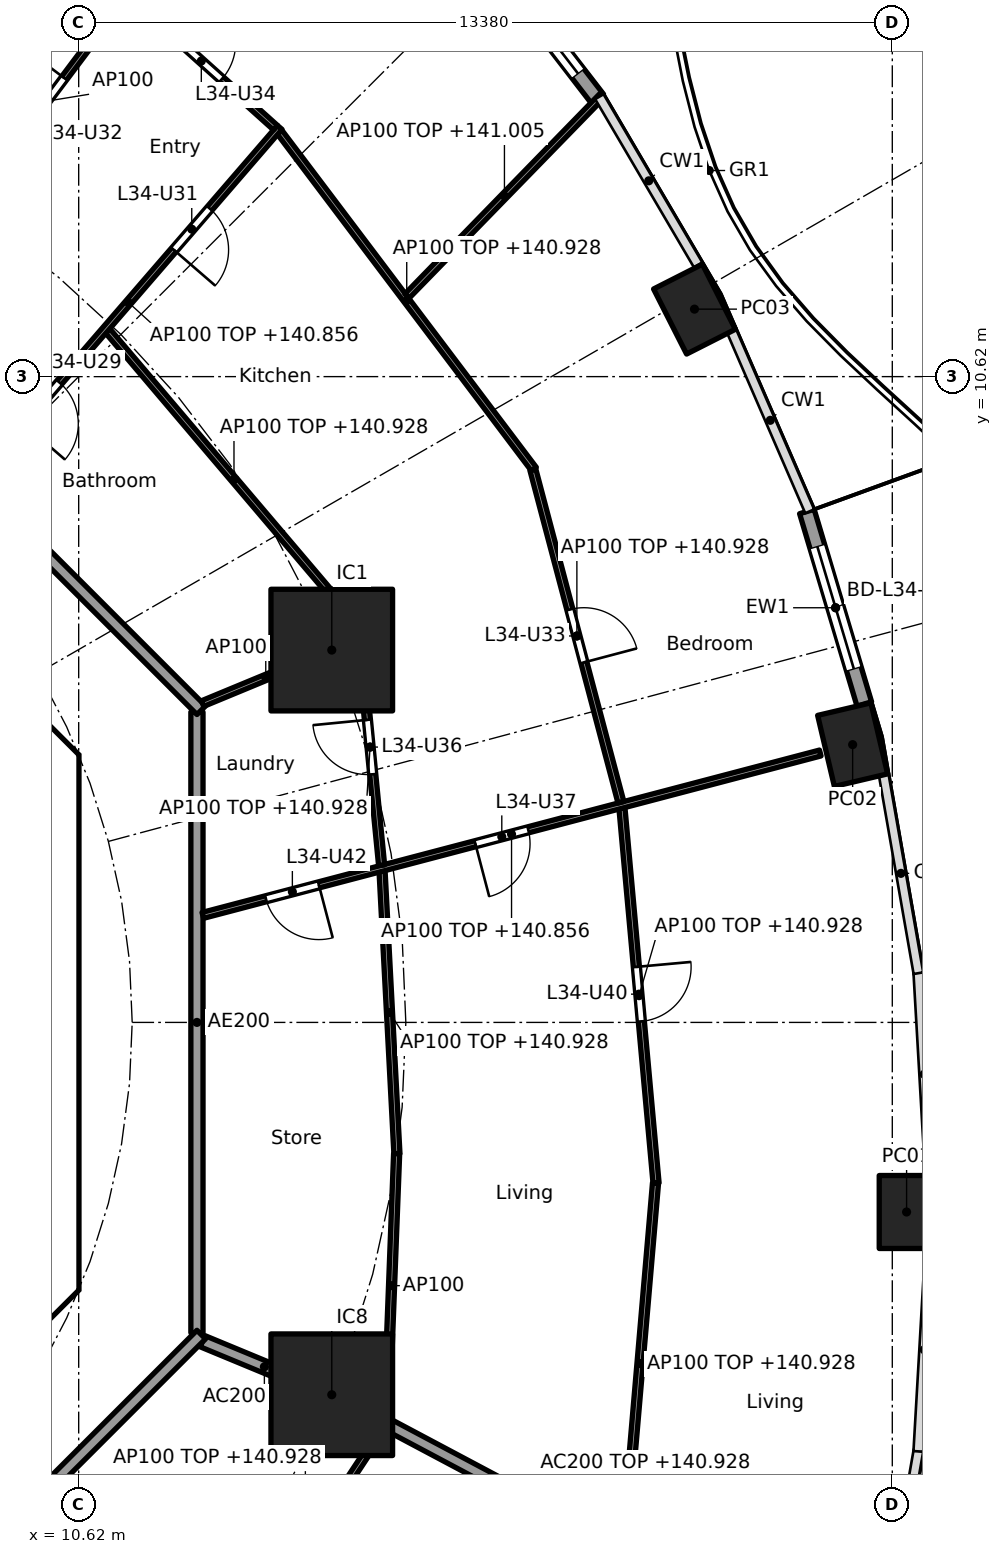
"""IFC4 building model, lengths in metres.
Left out: names, types, materials, properties, quantities, classifications, styles, units other than length and angle.
Written with IfcOpenShell. Run it as: python <this file> out.ifc"""

import sys

from ifc_helpers import new_model, si_unit, direction, frame, frame_2d, origin, origin_2d, place, context, subcontext, project, spatial, polyline, rectangle, hollow_rectangle, outline, extrude, element, fill, save


model = new_model("IFC4")
c1 = context("Model", 3, precision=1e-05, world=origin(), true_north=direction((0.0, 1.0)))
c2 = subcontext(c1, "Body", "Model", "MODEL_VIEW")
j1 = project(units=[si_unit("LENGTHUNIT", "METRE"), si_unit("PLANEANGLEUNIT", "RADIAN")], contexts=[c1])
p1 = place(None, origin())
s1 = spatial("IfcSite", under=j1, at=p1, CompositionType="ELEMENT")
p2 = place(p1, origin())
s2 = spatial("IfcBuilding", under=s1, at=p2, CompositionType="ELEMENT")
p3 = place(p2, frame((0.0, 0.0, 138.1)))
s3 = spatial("IfcBuildingStorey", under=s2, at=p3, CompositionType="ELEMENT", Elevation=138.1)
for number, where, z_axis, x_axis in (
    (1, (24.235, -3.118, 0.0), (0.0, 0.0, 1.0), (0.0, 1.0, 0.0)),
    (2, (23.348, 4.568, 0.0), (0.0, 0.0, 1.0), (-0.229, 0.973, 0.0)),
    (3, (20.747, 11.73, 0.0), (0.0, 0.0, 1.0), (-0.452, 0.892, 0.0)),
):
    element("IfcColumn", number, at=place(p3, frame(where, z_axis=z_axis, x_axis=x_axis)), inside=s3, PredefinedType="COLUMN", context=c2, shape_type="SweptSolid", body=[
        extrude(hollow_rectangle(XDim=1.2, YDim=0.9, WallThickness=0.04, at=origin_2d()), origin(), (0.0, 0.0, 1.0), 3.7),
    ])
for number, where, z_axis, x_axis in (
    (4, (14.782, 6.123, 0.0), (0.0, 0.0, 1.0), (1.0, 0.0, 0.0)),
    (5, (14.782, -6.123, 0.0), (0.0, 0.0, 1.0), (1.0, 0.0, 0.0)),
):
    element("IfcColumn", number, at=place(p3, frame(where, z_axis=z_axis, x_axis=x_axis)), inside=s3, PredefinedType="COLUMN", context=c2, shape_type="SweptSolid", body=[
        extrude(rectangle(XDim=2.0, YDim=2.0, at=origin_2d()), origin(), (0.0, 0.0, 1.0), 3.7),
    ])
p4 = place(p3, frame((22.595, 8.402, 0.0), z_axis=(0.0, 0.0, 1.0), x_axis=(0.285842038783, -0.958276749621, 0.0)))
e6 = element("IfcWall", 6, at=p4, inside=s3, PredefinedType="SOLIDWALL", context=c2, shape_type="SweptSolid", body=[
    extrude(rectangle(XDim=3.303, YDim=0.25, at=frame_2d((1.651, 0.0))), origin(), (0.0, 0.0, 1.0), 3.44),
])
p5 = place(p4, frame((0.602, 0.0, 0.0)))
e7 = element("IfcOpeningElement", 7, at=p5, cuts=e6, PredefinedType="OPENING", context=c2, shape_type="SweptSolid", body=[
    extrude(rectangle(XDim=2.1, YDim=2.4, at=frame_2d((1.05, 1.2))), frame((0.0, 0.135, 0.0), z_axis=(0.0, -1.0, 0.0), x_axis=(1.0, 0.0, 0.0)), (0.0, 0.0, 1.0), 0.27),
])
p6 = place(p3, frame((17.23, 17.682, 0.0), z_axis=(0.0, 0.0, 1.0), x_axis=(0.610429847179, -0.792070326217, 0.0)))
e8 = element("IfcWall", 8, at=p6, inside=s3, PredefinedType="SOLIDWALL", context=c2, shape_type="SweptSolid", body=[
    extrude(rectangle(XDim=3.149, YDim=0.25, at=frame_2d((1.575, 0.0))), origin(), (0.0, 0.0, 1.0), 3.44),
])
p7 = place(p6, frame((0.525, 0.0, 0.0)))
e9 = element("IfcOpeningElement", 9, at=p7, cuts=e8, PredefinedType="OPENING", context=c2, shape_type="SweptSolid", body=[
    extrude(rectangle(XDim=2.1, YDim=2.4, at=frame_2d((1.05, 1.2))), frame((0.0, 0.135, 0.0), z_axis=(0.0, -1.0, 0.0), x_axis=(1.0, 0.0, 0.0)), (0.0, 0.0, 1.0), 0.27),
])
p8 = place(p3, frame((9.988, 4.613, 0.0), z_axis=(0.0, 0.0, 1.0), x_axis=(-0.707106781187, 0.707106781187, 0.0)))
e10 = element("IfcWall", 10, at=p8, inside=s3, PredefinedType="SHEAR", context=c2, shape_type="SweptSolid", body=[
    extrude(rectangle(XDim=7.602, YDim=0.6, at=frame_2d((3.801, 0.0))), origin(), (0.0, 0.0, 1.0), 3.44),
])
p9 = place(p8, frame((3.201, 0.0, 0.0)))
e11 = element("IfcOpeningElement", 11, at=p9, cuts=e10, PredefinedType="OPENING", context=c2, shape_type="SweptSolid", body=[
    extrude(rectangle(XDim=1.2, YDim=2.1, at=frame_2d((0.6, 1.05))), frame((0.0, 0.31, 0.0), z_axis=(0.0, -1.0, 0.0), x_axis=(1.0, 0.0, 0.0)), (0.0, 0.0, 1.0), 0.62),
])
p10 = place(p3, frame((4.613, -9.988, 0.0), z_axis=(0.0, 0.0, 1.0), x_axis=(0.707106781187, 0.707106781187, 0.0)))
e12 = element("IfcWall", 12, at=p10, inside=s3, PredefinedType="SHEAR", context=c2, shape_type="SweptSolid", body=[
    extrude(rectangle(XDim=7.602, YDim=0.6, at=frame_2d((3.801, 0.0))), origin(), (0.0, 0.0, 1.0), 3.44),
])
p11 = place(p10, frame((3.201, 0.0, 0.0)))
e13 = element("IfcOpeningElement", 13, at=p11, cuts=e12, PredefinedType="OPENING", context=c2, shape_type="SweptSolid", body=[
    extrude(rectangle(XDim=1.2, YDim=2.1, at=frame_2d((0.6, 1.05))), frame((0.0, 0.31, 0.0), z_axis=(0.0, -1.0, 0.0), x_axis=(1.0, 0.0, 0.0)), (0.0, 0.0, 1.0), 0.62),
])
p12 = place(p3, origin())
e14 = element("IfcWall", 14, at=p12, inside=s3, PredefinedType="SHEAR", context=c2, shape_type="SweptSolid", body=[
    extrude(outline(polyline([(9.776, -4.401), (10.025, -4.152), (10.025, -3.801), (10.025, 4.152), (9.776, 4.401), (10.2, 4.825), (10.625, 4.401), (10.625, -4.401), (10.2, -4.825), (9.776, -4.401)])), origin(), (0.0, 0.0, 1.0), 3.44),
])
p13 = place(p3, frame((12.657, -5.243, 0.0), z_axis=(0.0, 0.0, 1.0), x_axis=(0.923846436004, -0.382763324632, 0.0)))
e15 = element("IfcWall", 15, at=p13, inside=s3, PredefinedType="PARTITIONING", context=c2, shape_type="SweptSolid", body=[
    extrude(rectangle(XDim=2.2, YDim=0.2, at=frame_2d((1.1, 0.0))), origin(), (0.0, 0.0, 1.0), 3.44),
])
p14 = place(p3, frame((14.826, -6.146, 0.0), z_axis=(0.0, 0.0, 1.0), x_axis=(0.883012998471, -0.469348532044, 0.0)))
e16 = element("IfcWall", 16, at=p14, inside=s3, PredefinedType="PARTITIONING", context=c2, shape_type="SweptSolid", body=[
    extrude(rectangle(XDim=9.172, YDim=0.2, at=frame_2d((4.586, 0.0))), origin(), (0.0, 0.0, 1.0), 2.828),
])
p15 = place(p3, frame((12.565, -5.104, 0.0), z_axis=(0.0, 0.0, 1.0), x_axis=(0.0, 1.0, 0.0)))
e17 = element("IfcWall", 17, at=p15, inside=s3, PredefinedType="PARTITIONING", context=c2, shape_type="SweptSolid", body=[
    extrude(rectangle(XDim=10.209, YDim=0.2, at=frame_2d((5.104, 0.0))), origin(), (0.0, 0.0, 1.0), 3.44),
])
p16 = place(p3, frame((12.635, 5.134, 0.0), z_axis=(0.0, 0.0, 1.0), x_axis=(-0.707106781187, 0.707106781187, 0.0)))
e18 = element("IfcWall", 18, at=p16, inside=s3, PredefinedType="PARTITIONING", context=c2, shape_type="SweptSolid", body=[
    extrude(rectangle(XDim=10.609, YDim=0.2, at=frame_2d((5.305, 0.0))), origin(), (0.0, 0.0, 1.0), 3.44),
])
p17 = place(p16, frame((6.106, 0.0, 0.0)))
e19 = element("IfcOpeningElement", 19, at=p17, cuts=e18, PredefinedType="OPENING", context=c2, shape_type="SweptSolid", body=[
    extrude(rectangle(XDim=1.0, YDim=2.1, at=frame_2d((0.5, 1.05))), frame((0.0, 0.11, 0.0), z_axis=(0.0, -1.0, 0.0), x_axis=(1.0, 0.0, 0.0)), (0.0, 0.0, 1.0), 0.22),
])
p18 = place(p3, frame((5.275, -12.494, 0.0), z_axis=(0.0, 0.0, 1.0), x_axis=(0.707106781187, 0.707106781187, 0.0)))
e20 = element("IfcWall", 20, at=p18, inside=s3, PredefinedType="PARTITIONING", context=c2, shape_type="SweptSolid", body=[
    extrude(rectangle(XDim=10.409, YDim=0.2, at=frame_2d((5.205, 0.0))), origin(), (0.0, 0.0, 1.0), 3.44),
])
p19 = place(p3, frame((15.853, -2.158, 0.0), z_axis=(0.0, 0.0, 1.0), x_axis=(-0.052509224895, 0.998620439056, 0.0)))
e21 = element("IfcWall", 21, at=p19, inside=s3, PredefinedType="PARTITIONING", context=c2, shape_type="SweptSolid", body=[
    extrude(rectangle(XDim=4.649, YDim=0.1, at=frame_2d((2.325, 0.0))), origin(), (0.0, 0.0, 1.0), 2.828),
])
p20 = place(p3, frame((15.849, -2.158, 0.0), z_axis=(0.0, 0.0, 1.0), x_axis=(-0.03838348155, -0.999263082648, 0.0)))
e22 = element("IfcWall", 22, at=p20, inside=s3, PredefinedType="PARTITIONING", context=c2, shape_type="SweptSolid", body=[
    extrude(rectangle(XDim=4.344, YDim=0.1, at=frame_2d((2.172, 0.0))), origin(), (0.0, 0.0, 1.0), 3.44),
])
p21 = place(p3, frame((20.115, -2.642, 0.0), z_axis=(0.0, 0.0, 1.0), x_axis=(-0.090567755363, 0.995890296011, 0.0)))
e23 = element("IfcWall", 23, at=p21, inside=s3, PredefinedType="PARTITIONING", context=c2, shape_type="SweptSolid", body=[
    extrude(rectangle(XDim=6.189, YDim=0.1, at=frame_2d((3.095, 0.0))), origin(), (0.0, 0.0, 1.0), 2.828),
])
p22 = place(p21, frame((2.67, 0.0, 0.0)))
e24 = element("IfcOpeningElement", 24, at=p22, cuts=e23, PredefinedType="OPENING", context=c2, shape_type="SweptSolid", body=[
    extrude(rectangle(XDim=0.9, YDim=2.1, at=frame_2d((0.45, 1.05))), frame((0.0, 0.06, 0.0), z_axis=(0.0, -1.0, 0.0), x_axis=(1.0, 0.0, 0.0)), (0.0, 0.0, 1.0), 0.12),
])
p23 = place(p3, frame((20.106, -2.642, 0.0), z_axis=(0.0, 0.0, 1.0), x_axis=(-0.085694058383, -0.996321498492, 0.0)))
e25 = element("IfcWall", 25, at=p23, inside=s3, PredefinedType="PARTITIONING", context=c2, shape_type="SweptSolid", body=[
    extrude(rectangle(XDim=5.957, YDim=0.1, at=frame_2d((2.979, 0.0))), origin(), (0.0, 0.0, 1.0), 2.828),
])
p24 = place(p3, frame((12.661, 1.76, 0.0), z_axis=(0.0, 0.0, 1.0), x_axis=(0.967120304949, 0.254319318488, 0.0)))
e26 = element("IfcWall", 26, at=p24, inside=s3, PredefinedType="PARTITIONING", context=c2, shape_type="SweptSolid", body=[
    extrude(rectangle(XDim=10.499, YDim=0.1, at=frame_2d((5.25, 0.0))), origin(), (0.0, 0.0, 1.0), 2.756),
])
p25 = place(p24, frame((4.634, 0.0, 0.0)))
e27 = element("IfcOpeningElement", 27, at=p25, cuts=e26, PredefinedType="OPENING", context=c2, shape_type="SweptSolid", body=[
    extrude(rectangle(XDim=0.9, YDim=2.1, at=frame_2d((0.45, 1.05))), frame((0.0, 0.06, 0.0), z_axis=(0.0, -1.0, 0.0), x_axis=(1.0, 0.0, 0.0)), (0.0, 0.0, 1.0), 0.12),
])
p26 = place(p24, frame((1.073, 0.0, 0.0)))
e28 = element("IfcOpeningElement", 28, at=p26, cuts=e26, PredefinedType="OPENING", context=c2, shape_type="SweptSolid", body=[
    extrude(rectangle(XDim=0.9, YDim=2.1, at=frame_2d((0.45, 1.05))), frame((0.0, 0.06, 0.0), z_axis=(0.0, -1.0, 0.0), x_axis=(1.0, 0.0, 0.0)), (0.0, 0.0, 1.0), 0.12),
])
p27 = place(p3, frame((15.602, 2.584, 0.0), z_axis=(0.0, 0.0, 1.0), x_axis=(-0.097207196705, 0.995264166394, 0.0)))
e29 = element("IfcWall", 29, at=p27, inside=s3, PredefinedType="PARTITIONING", context=c2, shape_type="SweptSolid", body=[
    extrude(rectangle(XDim=3.906, YDim=0.1, at=frame_2d((1.953, 0.0))), origin(), (0.0, 0.0, 1.0), 2.828),
])
p28 = place(p27, frame((1.503, 0.0, 0.0)))
e30 = element("IfcOpeningElement", 30, at=p28, cuts=e29, PredefinedType="OPENING", context=c2, shape_type="SweptSolid", body=[
    extrude(rectangle(XDim=0.9, YDim=2.1, at=frame_2d((0.45, 1.05))), frame((0.0, 0.06, 0.0), z_axis=(0.0, -1.0, 0.0), x_axis=(1.0, 0.0, 0.0)), (0.0, 0.0, 1.0), 0.12),
])
p29 = place(p3, frame((19.537, 3.62, 0.0), z_axis=(0.0, 0.0, 1.0), x_axis=(-0.255892560316, 0.966705227862, 0.0)))
e31 = element("IfcWall", 31, at=p29, inside=s3, PredefinedType="PARTITIONING", context=c2, shape_type="SweptSolid", body=[
    extrude(rectangle(XDim=5.659, YDim=0.1, at=frame_2d((2.829, 0.0))), origin(), (0.0, 0.0, 1.0), 2.828),
])
p30 = place(p29, frame((2.379, 0.0, 0.0)))
e32 = element("IfcOpeningElement", 32, at=p30, cuts=e31, PredefinedType="OPENING", context=c2, shape_type="SweptSolid", body=[
    extrude(rectangle(XDim=0.9, YDim=2.1, at=frame_2d((0.45, 1.05))), frame((0.0, 0.06, 0.0), z_axis=(0.0, -1.0, 0.0), x_axis=(1.0, 0.0, 0.0)), (0.0, 0.0, 1.0), 0.12),
])
p31 = place(p3, frame((12.657, 5.243, 0.0), z_axis=(0.0, 0.0, 1.0), x_axis=(0.923864733477, 0.382719158442, 0.0)))
e33 = element("IfcWall", 33, at=p31, inside=s3, PredefinedType="PARTITIONING", context=c2, shape_type="SweptSolid", body=[
    extrude(rectangle(XDim=2.25, YDim=0.1, at=frame_2d((1.125, 0.0))), origin(), (0.0, 0.0, 1.0), 3.44),
])
p32 = place(p3, frame((15.25, 6.483, 0.0), z_axis=(0.0, 0.0, 1.0), x_axis=(-0.647379829894, 0.762167537912, 0.0)))
e34 = element("IfcWall", 34, at=p32, inside=s3, PredefinedType="PARTITIONING", context=c2, shape_type="SweptSolid", body=[
    extrude(rectangle(XDim=6.413, YDim=0.1, at=frame_2d((3.206, 0.0))), origin(), (0.0, 0.0, 1.0), 2.828),
])
p33 = place(p3, frame((18.106, 9.098, 0.0), z_axis=(0.0, 0.0, 1.0), x_axis=(-0.602393803621, 0.798199038686, 0.0)))
e35 = element("IfcWall", 35, at=p33, inside=s3, PredefinedType="PARTITIONING", context=c2, shape_type="SweptSolid", body=[
    extrude(rectangle(XDim=6.944, YDim=0.1, at=frame_2d((3.472, 0.0))), origin(), (0.0, 0.0, 1.0), 2.828),
])
p34 = place(p3, frame((16.02, 11.946, 0.0), z_axis=(0.0, 0.0, 1.0), x_axis=(0.697741638446, 0.71634949988, 0.0)))
e36 = element("IfcWall", 36, at=p34, inside=s3, PredefinedType="PARTITIONING", context=c2, shape_type="SweptSolid", body=[
    extrude(rectangle(XDim=4.592, YDim=0.1, at=frame_2d((2.296, 0.0))), origin(), (0.0, 0.0, 1.0), 2.905),
])
p35 = place(p3, frame((8.95, 8.96, 0.0), z_axis=(0.0, 0.0, 1.0), x_axis=(0.653829477183, 0.756641932995, 0.0)))
e37 = element("IfcWall", 37, at=p35, inside=s3, PredefinedType="PARTITIONING", context=c2, shape_type="SweptSolid", body=[
    extrude(rectangle(XDim=7.611, YDim=0.1, at=frame_2d((3.805, 0.0))), origin(), (0.0, 0.0, 1.0), 2.756),
])
p36 = place(p35, frame((1.168, 0.0, 0.0)))
e38 = element("IfcOpeningElement", 38, at=p36, cuts=e37, PredefinedType="OPENING", context=c2, shape_type="SweptSolid", body=[
    extrude(rectangle(XDim=0.9, YDim=2.1, at=frame_2d((0.45, 1.05))), frame((0.0, 0.06, 0.0), z_axis=(0.0, -1.0, 0.0), x_axis=(1.0, 0.0, 0.0)), (0.0, 0.0, 1.0), 0.12),
])
p37 = place(p35, frame((4.948, 0.0, 0.0)))
e39 = element("IfcOpeningElement", 39, at=p37, cuts=e37, PredefinedType="OPENING", context=c2, shape_type="SweptSolid", body=[
    extrude(rectangle(XDim=0.9, YDim=2.1, at=frame_2d((0.45, 1.05))), frame((0.0, 0.06, 0.0), z_axis=(0.0, -1.0, 0.0), x_axis=(1.0, 0.0, 0.0)), (0.0, 0.0, 1.0), 0.12),
])
p38 = place(p3, frame((13.856, 14.714, 0.0), z_axis=(0.0, 0.0, 1.0), x_axis=(-0.743793479211, 0.668409500444, 0.0)))
e40 = element("IfcWall", 40, at=p38, inside=s3, PredefinedType="PARTITIONING", context=c2, shape_type="SweptSolid", body=[
    extrude(rectangle(XDim=6.659, YDim=0.1, at=frame_2d((3.329, 0.0))), origin(), (0.0, 0.0, 1.0), 2.828),
])
p39 = place(p38, frame((1.19, 0.0, 0.0)))
e41 = element("IfcOpeningElement", 41, at=p39, cuts=e40, PredefinedType="OPENING", context=c2, shape_type="SweptSolid", body=[
    extrude(rectangle(XDim=0.9, YDim=2.1, at=frame_2d((0.45, 1.05))), frame((0.0, 0.06, 0.0), z_axis=(0.0, -1.0, 0.0), x_axis=(1.0, 0.0, 0.0)), (0.0, 0.0, 1.0), 0.12),
])
p40 = place(p3, frame((8.81, 13.434, 0.0), z_axis=(0.0, 0.0, 1.0), x_axis=(0.600491337497, 0.799631261014, 0.0)))
e42 = element("IfcWall", 42, at=p40, inside=s3, PredefinedType="PARTITIONING", context=c2, shape_type="SweptSolid", body=[
    extrude(rectangle(XDim=4.292, YDim=0.1, at=frame_2d((2.146, 0.0))), origin(), (0.0, 0.0, 1.0), 3.44),
])
p41 = place(p40, frame((1.721, 0.0, 0.0)))
e43 = element("IfcOpeningElement", 43, at=p41, cuts=e42, PredefinedType="OPENING", context=c2, shape_type="SweptSolid", body=[
    extrude(rectangle(XDim=0.9, YDim=2.1, at=frame_2d((0.45, 1.05))), frame((0.0, 0.06, 0.0), z_axis=(0.0, -1.0, 0.0), x_axis=(1.0, 0.0, 0.0)), (0.0, 0.0, 1.0), 0.12),
])
p42 = place(p3, frame((13.072, -10.55, 0.0), z_axis=(0.0, 0.0, 1.0), x_axis=(0.550607247415, 0.834764433295, 0.0)))
e44 = element("IfcWall", 44, at=p42, inside=s3, PredefinedType="PARTITIONING", context=c2, shape_type="SweptSolid", body=[
    extrude(rectangle(XDim=4.633, YDim=0.1, at=frame_2d((2.316, 0.0))), origin(), (0.0, 0.0, 1.0), 2.828),
])
p43 = place(p42, frame((1.891, 0.0, 0.0)))
e45 = element("IfcOpeningElement", 45, at=p43, cuts=e44, PredefinedType="OPENING", context=c2, shape_type="SweptSolid", body=[
    extrude(rectangle(XDim=0.9, YDim=2.1, at=frame_2d((0.45, 1.05))), frame((0.0, 0.06, 0.0), z_axis=(0.0, -1.0, 0.0), x_axis=(1.0, 0.0, 0.0)), (0.0, 0.0, 1.0), 0.12),
])
p44 = place(p5, origin())
e46 = element("IfcDoor", 46, at=p44, inside=s3, OperationType="SLIDING_TO_LEFT", PredefinedType="DOOR", context=c2, shape_type="SweptSolid", body=[
    extrude(rectangle(XDim=2.1, YDim=2.4, at=frame_2d((1.05, 1.2))), frame((0.0, 0.025, 0.0), z_axis=(0.0, -1.0, 0.0), x_axis=(1.0, 0.0, 0.0)), (0.0, 0.0, 1.0), 0.05),
])
fill(e7, e46)
p45 = place(p7, origin())
e47 = element("IfcDoor", 47, at=p45, inside=s3, OperationType="SLIDING_TO_LEFT", PredefinedType="DOOR", context=c2, shape_type="SweptSolid", body=[
    extrude(rectangle(XDim=2.1, YDim=2.4, at=frame_2d((1.05, 1.2))), frame((0.0, 0.025, 0.0), z_axis=(0.0, -1.0, 0.0), x_axis=(1.0, 0.0, 0.0)), (0.0, 0.0, 1.0), 0.05),
])
fill(e9, e47)
p46 = place(p36, frame((0.9, 0.0, 0.0), x_axis=(-1.0, 0.0, 0.0)))
e48 = element("IfcDoor", 48, at=p46, inside=s3, OperationType="SINGLE_SWING_RIGHT", PredefinedType="DOOR", context=c2, shape_type="SweptSolid", body=[
    extrude(rectangle(XDim=0.9, YDim=2.1, at=frame_2d((0.45, 1.05))), frame((0.0, 0.025, 0.0), z_axis=(0.0, -1.0, 0.0), x_axis=(1.0, 0.0, 0.0)), (0.0, 0.0, 1.0), 0.05),
])
fill(e38, e48)
p47 = place(p37, frame((0.9, 0.0, 0.0), x_axis=(-1.0, 0.0, 0.0)))
e49 = element("IfcDoor", 49, at=p47, inside=s3, OperationType="SINGLE_SWING_RIGHT", PredefinedType="DOOR", context=c2, shape_type="SweptSolid", body=[
    extrude(rectangle(XDim=0.9, YDim=2.1, at=frame_2d((0.45, 1.05))), frame((0.0, 0.025, 0.0), z_axis=(0.0, -1.0, 0.0), x_axis=(1.0, 0.0, 0.0)), (0.0, 0.0, 1.0), 0.05),
])
fill(e39, e49)
p48 = place(p41, origin())
e50 = element("IfcDoor", 50, at=p48, inside=s3, OperationType="SINGLE_SWING_RIGHT", PredefinedType="DOOR", context=c2, shape_type="SweptSolid", body=[
    extrude(rectangle(XDim=0.9, YDim=2.1, at=frame_2d((0.45, 1.05))), frame((0.0, 0.025, 0.0), z_axis=(0.0, -1.0, 0.0), x_axis=(1.0, 0.0, 0.0)), (0.0, 0.0, 1.0), 0.05),
])
fill(e43, e50)
p49 = place(p30, frame((0.9, 0.0, 0.0), x_axis=(-1.0, 0.0, 0.0)))
e51 = element("IfcDoor", 51, at=p49, inside=s3, OperationType="SINGLE_SWING_RIGHT", PredefinedType="DOOR", context=c2, shape_type="SweptSolid", body=[
    extrude(rectangle(XDim=0.9, YDim=2.1, at=frame_2d((0.45, 1.05))), frame((0.0, 0.025, 0.0), z_axis=(0.0, -1.0, 0.0), x_axis=(1.0, 0.0, 0.0)), (0.0, 0.0, 1.0), 0.05),
])
fill(e32, e51)
p50 = place(p39, frame((0.9, 0.0, 0.0), x_axis=(-1.0, 0.0, 0.0)))
e52 = element("IfcDoor", 52, at=p50, inside=s3, OperationType="SINGLE_SWING_LEFT", PredefinedType="DOOR", context=c2, shape_type="SweptSolid", body=[
    extrude(rectangle(XDim=0.9, YDim=2.1, at=frame_2d((0.45, 1.05))), frame((0.0, 0.025, 0.0), z_axis=(0.0, -1.0, 0.0), x_axis=(1.0, 0.0, 0.0)), (0.0, 0.0, 1.0), 0.05),
])
fill(e41, e52)
p51 = place(p28, origin())
e53 = element("IfcDoor", 53, at=p51, inside=s3, OperationType="SINGLE_SWING_RIGHT", PredefinedType="DOOR", context=c2, shape_type="SweptSolid", body=[
    extrude(rectangle(XDim=0.9, YDim=2.1, at=frame_2d((0.45, 1.05))), frame((0.0, 0.025, 0.0), z_axis=(0.0, -1.0, 0.0), x_axis=(1.0, 0.0, 0.0)), (0.0, 0.0, 1.0), 0.05),
])
fill(e30, e53)
p52 = place(p25, frame((0.9, 0.0, 0.0), x_axis=(-1.0, 0.0, 0.0)))
e54 = element("IfcDoor", 54, at=p52, inside=s3, OperationType="SINGLE_SWING_RIGHT", PredefinedType="DOOR", context=c2, shape_type="SweptSolid", body=[
    extrude(rectangle(XDim=0.9, YDim=2.1, at=frame_2d((0.45, 1.05))), frame((0.0, 0.025, 0.0), z_axis=(0.0, -1.0, 0.0), x_axis=(1.0, 0.0, 0.0)), (0.0, 0.0, 1.0), 0.05),
])
fill(e27, e54)
p53 = place(p22, frame((0.9, 0.0, 0.0), x_axis=(-1.0, 0.0, 0.0)))
e55 = element("IfcDoor", 55, at=p53, inside=s3, OperationType="SINGLE_SWING_LEFT", PredefinedType="DOOR", context=c2, shape_type="SweptSolid", body=[
    extrude(rectangle(XDim=0.9, YDim=2.1, at=frame_2d((0.45, 1.05))), frame((0.0, 0.025, 0.0), z_axis=(0.0, -1.0, 0.0), x_axis=(1.0, 0.0, 0.0)), (0.0, 0.0, 1.0), 0.05),
])
fill(e24, e55)
p54 = place(p26, frame((0.9, 0.0, 0.0), x_axis=(-1.0, 0.0, 0.0)))
e56 = element("IfcDoor", 56, at=p54, inside=s3, OperationType="SINGLE_SWING_LEFT", PredefinedType="DOOR", context=c2, shape_type="SweptSolid", body=[
    extrude(rectangle(XDim=0.9, YDim=2.1, at=frame_2d((0.45, 1.05))), frame((0.0, 0.025, 0.0), z_axis=(0.0, -1.0, 0.0), x_axis=(1.0, 0.0, 0.0)), (0.0, 0.0, 1.0), 0.05),
])
fill(e28, e56)
save(model, sys.argv[1])
